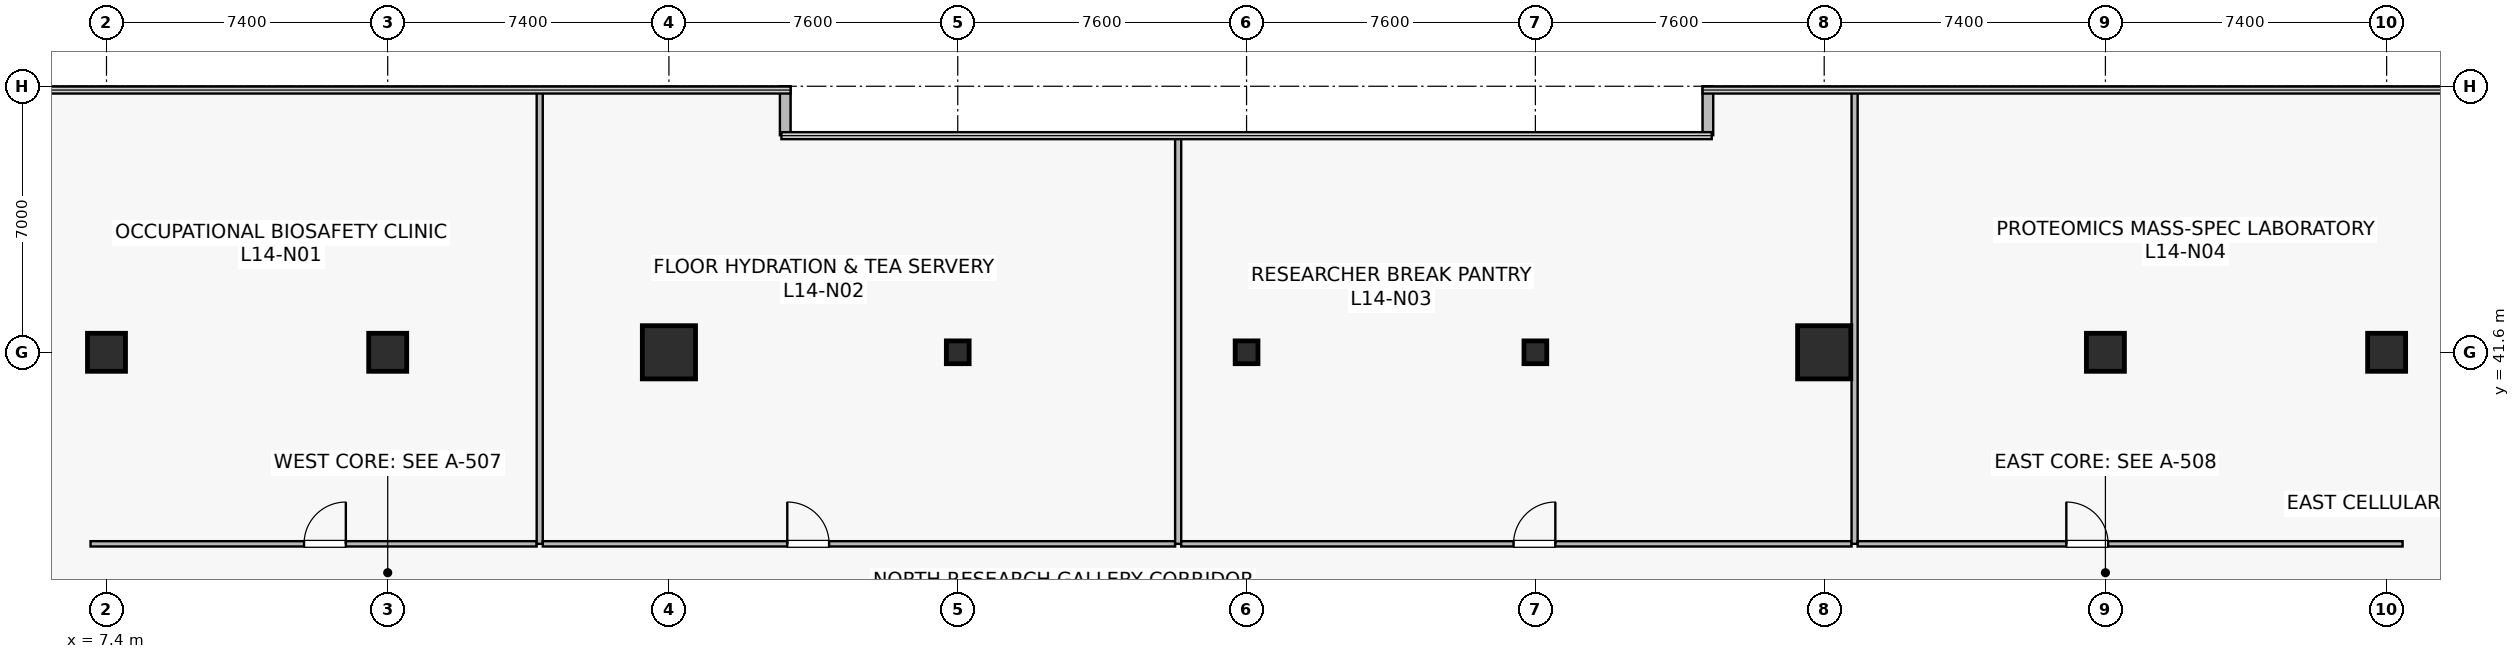
"""IFC4 building model, lengths in metres.
Left out: names, types, materials, properties, quantities, classifications, styles, units other than length and angle.
Written with IfcOpenShell. Run it as: python <this file> out.ifc"""

import sys

from ifc_helpers import new_model, si_unit, direction, frame, frame_2d, origin, origin_2d, place, context, subcontext, project, spatial, rectangle, hollow_rectangle, extrude, source, transform, mapped, element, fill, save


model = new_model("IFC4")
c1 = context("Model", 3, precision=1e-05, world=origin(), true_north=direction((0.0, 1.0)))
c2 = subcontext(c1, "Body", "Model", "MODEL_VIEW")
j1 = project(units=[si_unit("LENGTHUNIT", "METRE"), si_unit("PLANEANGLEUNIT", "RADIAN")], contexts=[c1])
p1 = place(None, origin())
s1 = spatial("IfcSite", under=j1, at=p1, CompositionType="ELEMENT")
p2 = place(p1, origin())
s2 = spatial("IfcBuilding", under=s1, at=p2, CompositionType="ELEMENT")
p3 = place(p2, frame((0.0, 0.0, 58.0)))
s3 = spatial("IfcBuildingStorey", under=s2, at=p3, CompositionType="ELEMENT", Elevation=58.0)
m1 = source(origin(), c2, "Body", "SweptSolid", [
    extrude(rectangle(XDim=1.0, YDim=1.0, at=origin_2d()), origin(), (0.0, 0.0, 1.0), 4.1),
])
p4 = place(p3, frame((14.8, 41.6, 0.0), z_axis=(0.0, 0.0, 1.0), x_axis=(1.0, 0.0, 0.0)))
e1 = element("IfcColumn", 1, at=p4, inside=s3, PredefinedType="COLUMN", context=c2, shape_type="MappedRepresentation", body=[
    mapped(m1, transform((0.0, 0.0, 0.0), scale=1.0)),
])
m2 = source(origin(), c2, "Body", "SweptSolid", [
    extrude(rectangle(XDim=1.4, YDim=1.4, at=origin_2d()), origin(), (0.0, 0.0, 1.0), 4.1),
])
for number, where, z_axis, x_axis in (
    (2, (22.2, 41.6, 0.0), (0.0, 0.0, 1.0), (1.0, 0.0, 0.0)),
    (3, (52.6, 41.6, 0.0), (0.0, 0.0, 1.0), (1.0, 0.0, 0.0)),
):
    element("IfcColumn", number, at=place(p3, frame(where, z_axis=z_axis, x_axis=x_axis)), inside=s3, PredefinedType="COLUMN", context=c2, shape_type="MappedRepresentation", body=[
        mapped(m2, transform((0.0, 0.0, 0.0), scale=1.0)),
    ])
for number, where, z_axis, x_axis in (
    (4, (60.0, 41.6, 0.0), (0.0, 0.0, 1.0), (1.0, 0.0, 0.0)),
    (5, (7.4, 41.6, 0.0), (0.0, 0.0, 1.0), (1.0, 0.0, 0.0)),
    (6, (67.4, 41.6, 0.0), (0.0, 0.0, 1.0), (1.0, 0.0, 0.0)),
):
    element("IfcColumn", number, at=place(p3, frame(where, z_axis=z_axis, x_axis=x_axis)), inside=s3, PredefinedType="COLUMN", context=c2, shape_type="MappedRepresentation", body=[
        mapped(m1, transform((0.0, 0.0, 0.0), scale=1.0)),
    ])
m3 = source(origin(), c2, "Body", "SweptSolid", [
    extrude(hollow_rectangle(XDim=0.6, YDim=0.6, WallThickness=0.028, at=origin_2d()), origin(), (0.0, 0.0, 1.0), 4.1),
])
for number, where, z_axis, x_axis in (
    (7, (29.8, 41.6, 0.0), (0.0, 0.0, 1.0), (1.0, 0.0, 0.0)),
    (8, (37.4, 41.6, 0.0), (0.0, 0.0, 1.0), (1.0, 0.0, 0.0)),
    (9, (45.0, 41.6, 0.0), (0.0, 0.0, 1.0), (1.0, 0.0, 0.0)),
):
    element("IfcColumn", number, at=place(p3, frame(where, z_axis=z_axis, x_axis=x_axis)), inside=s3, PredefinedType="COLUMN", context=c2, shape_type="MappedRepresentation", body=[
        mapped(m3, transform((0.0, 0.0, 0.0), scale=1.0)),
    ])
for number, where, z_axis, x_axis in (
    (10, (49.54, 48.6, 0.0), (0.0, 0.0, 1.0), (0.0, -1.0, 0.0)),
    (11, (25.26, 47.312, 0.0), (0.0, 0.0, 1.0), (0.0, 1.0, 0.0)),
):
    element("IfcWall", number, at=place(p3, frame(where, z_axis=z_axis, x_axis=x_axis)), inside=s3, PredefinedType="STANDARD", context=c2, shape_type="SweptSolid", body=[
        extrude(rectangle(XDim=1.288, YDim=0.28, at=frame_2d((0.644, 0.0))), origin(), (0.0, 0.0, 1.0), 3.78),
    ])
p5 = place(p3, frame((6.98, 36.56, 0.0), z_axis=(0.0, 0.0, 1.0), x_axis=(1.0, 0.0, 0.0)))
e12 = element("IfcWall", 12, at=p5, inside=s3, PredefinedType="PARTITIONING", context=c2, shape_type="SweptSolid", body=[
    extrude(rectangle(XDim=11.74, YDim=0.14, at=frame_2d((5.87, 0.0))), origin(), (0.0, 0.0, 1.0), 3.065),
])
p6 = place(p5, frame((5.618, 0.0, 0.0)))
e13 = element("IfcOpeningElement", 13, at=p6, cuts=e12, PredefinedType="OPENING", context=c2, shape_type="SweptSolid", body=[
    extrude(rectangle(XDim=1.1, YDim=2.18, at=frame_2d((0.55, 1.09))), frame((0.0, 0.08, 0.0), z_axis=(0.0, -1.0, 0.0), x_axis=(1.0, 0.0, 0.0)), (0.0, 0.0, 1.0), 0.16),
])
p7 = place(p3, frame((18.8, 36.56, 0.0), z_axis=(0.0, 0.0, 1.0), x_axis=(0.0, 1.0, 0.0)))
e14 = element("IfcWall", 14, at=p7, inside=s3, PredefinedType="PARTITIONING", context=c2, shape_type="SweptSolid", body=[
    extrude(rectangle(XDim=11.93, YDim=0.16, at=frame_2d((5.965, 0.0))), origin(), (0.0, 0.0, 1.0), 3.015),
])
p8 = place(p3, frame((18.88, 36.56, 0.0), z_axis=(0.0, 0.0, 1.0), x_axis=(1.0, 0.0, 0.0)))
e15 = element("IfcWall", 15, at=p8, inside=s3, PredefinedType="PARTITIONING", context=c2, shape_type="SweptSolid", body=[
    extrude(rectangle(XDim=16.64, YDim=0.14, at=frame_2d((8.32, 0.0))), origin(), (0.0, 0.0, 1.0), 3.065),
])
p9 = place(p8, frame((6.434, 0.0, 0.0)))
e16 = element("IfcOpeningElement", 16, at=p9, cuts=e15, PredefinedType="OPENING", context=c2, shape_type="SweptSolid", body=[
    extrude(rectangle(XDim=1.1, YDim=2.18, at=frame_2d((0.55, 1.09))), frame((0.0, 0.08, 0.0), z_axis=(0.0, -1.0, 0.0), x_axis=(1.0, 0.0, 0.0)), (0.0, 0.0, 1.0), 0.16),
])
p10 = place(p3, frame((35.6, 36.56, 0.0), z_axis=(0.0, 0.0, 1.0), x_axis=(0.0, 1.0, 0.0)))
e17 = element("IfcWall", 17, at=p10, inside=s3, PredefinedType="PARTITIONING", context=c2, shape_type="SweptSolid", body=[
    extrude(rectangle(XDim=10.73, YDim=0.16, at=frame_2d((5.365, 0.0))), origin(), (0.0, 0.0, 1.0), 3.015),
])
p11 = place(p3, frame((35.68, 36.56, 0.0), z_axis=(0.0, 0.0, 1.0), x_axis=(1.0, 0.0, 0.0)))
e18 = element("IfcWall", 18, at=p11, inside=s3, PredefinedType="PARTITIONING", context=c2, shape_type="SweptSolid", body=[
    extrude(rectangle(XDim=17.64, YDim=0.14, at=frame_2d((8.82, 0.0))), origin(), (0.0, 0.0, 1.0), 3.065),
])
p12 = place(p11, frame((8.745, 0.0, 0.0)))
e19 = element("IfcOpeningElement", 19, at=p12, cuts=e18, PredefinedType="OPENING", context=c2, shape_type="SweptSolid", body=[
    extrude(rectangle(XDim=1.1, YDim=2.18, at=frame_2d((0.55, 1.09))), frame((0.0, 0.08, 0.0), z_axis=(0.0, -1.0, 0.0), x_axis=(1.0, 0.0, 0.0)), (0.0, 0.0, 1.0), 0.16),
])
p13 = place(p3, frame((53.4, 36.56, 0.0), z_axis=(0.0, 0.0, 1.0), x_axis=(0.0, 1.0, 0.0)))
e20 = element("IfcWall", 20, at=p13, inside=s3, PredefinedType="PARTITIONING", context=c2, shape_type="SweptSolid", body=[
    extrude(rectangle(XDim=11.93, YDim=0.16, at=frame_2d((5.965, 0.0))), origin(), (0.0, 0.0, 1.0), 3.015),
])
p14 = place(p3, frame((53.48, 36.56, 0.0), z_axis=(0.0, 0.0, 1.0), x_axis=(1.0, 0.0, 0.0)))
e21 = element("IfcWall", 21, at=p14, inside=s3, PredefinedType="PARTITIONING", context=c2, shape_type="SweptSolid", body=[
    extrude(rectangle(XDim=14.34, YDim=0.14, at=frame_2d((7.17, 0.0))), origin(), (0.0, 0.0, 1.0), 3.065),
])
p15 = place(p14, frame((5.491, 0.0, 0.0)))
e22 = element("IfcOpeningElement", 22, at=p15, cuts=e21, PredefinedType="OPENING", context=c2, shape_type="SweptSolid", body=[
    extrude(rectangle(XDim=1.1, YDim=2.18, at=frame_2d((0.55, 1.09))), frame((0.0, 0.08, 0.0), z_axis=(0.0, -1.0, 0.0), x_axis=(1.0, 0.0, 0.0)), (0.0, 0.0, 1.0), 0.16),
])
m4 = source(origin(), c2, "Body", "SweptSolid", [
    extrude(rectangle(XDim=1.1, YDim=2.18, at=frame_2d((0.55, 1.09))), frame((0.0, 0.025, 0.0), z_axis=(0.0, -1.0, 0.0), x_axis=(1.0, 0.0, 0.0)), (0.0, 0.0, 1.0), 0.05),
])
p16 = place(p6, origin())
e23 = element("IfcDoor", 23, at=p16, inside=s3, OperationType="SINGLE_SWING_RIGHT", PredefinedType="DOOR", context=c2, shape_type="MappedRepresentation", body=[
    mapped(m4, transform((0.0, 0.0, 0.0), scale=1.0)),
])
fill(e13, e23)
p17 = place(p9, origin())
e24 = element("IfcDoor", 24, at=p17, inside=s3, OperationType="SINGLE_SWING_LEFT", PredefinedType="DOOR", context=c2, shape_type="MappedRepresentation", body=[
    mapped(m4, transform((0.0, 0.0, 0.0), scale=1.0)),
])
fill(e16, e24)
p18 = place(p12, origin())
e25 = element("IfcDoor", 25, at=p18, inside=s3, OperationType="SINGLE_SWING_RIGHT", PredefinedType="DOOR", context=c2, shape_type="MappedRepresentation", body=[
    mapped(m4, transform((0.0, 0.0, 0.0), scale=1.0)),
])
fill(e19, e25)
p19 = place(p15, origin())
e26 = element("IfcDoor", 26, at=p19, inside=s3, OperationType="SINGLE_SWING_LEFT", PredefinedType="DOOR", context=c2, shape_type="MappedRepresentation", body=[
    mapped(m4, transform((0.0, 0.0, 0.0), scale=1.0)),
])
fill(e22, e26)
save(model, sys.argv[1])
